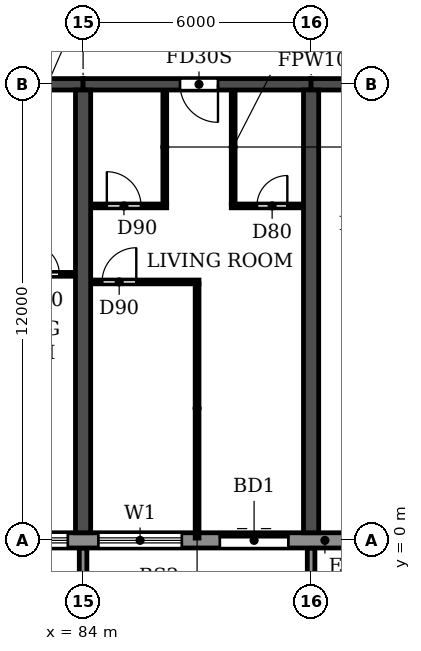
"""IFC4 building model, lengths in metres.
Left out: names, types, materials, properties, quantities, classifications, styles, units other than length and angle.
Written with IfcOpenShell. Run it as: python <this file> out.ifc"""

import sys

from ifc_helpers import new_model, si_unit, direction, frame, frame_2d, origin, place, context, subcontext, project, spatial, polyline, rectangle, outline, extrude, source, transform, mapped, element, fill, save


model = new_model("IFC4")
c1 = context("Model", 3, precision=1e-05, world=origin(), true_north=direction((0.0, 1.0)))
c2 = subcontext(c1, "Body", "Model", "MODEL_VIEW")
j1 = project(units=[si_unit("LENGTHUNIT", "METRE"), si_unit("PLANEANGLEUNIT", "RADIAN")], contexts=[c1])
p1 = place(None, origin())
s1 = spatial("IfcSite", under=j1, at=p1, CompositionType="ELEMENT")
p2 = place(p1, origin())
s2 = spatial("IfcBuilding", under=s1, at=p2, CompositionType="ELEMENT")
p3 = place(p2, frame((0.0, 0.0, 63.0)))
s3 = spatial("IfcBuildingStorey", under=s2, at=p3, CompositionType="ELEMENT", Elevation=63.0)
for number, where, z_axis, x_axis in (
    (1, (84.0, 0.2, 0.0), (0.0, 0.0, 1.0), (0.0, 1.0, 0.0)),
    (2, (90.0, 0.2, 0.0), (0.0, 0.0, 1.0), (0.0, 1.0, 0.0)),
):
    element("IfcWall", number, at=place(p3, frame(where, z_axis=z_axis, x_axis=x_axis)), inside=s3, PredefinedType="SHEAR", context=c2, shape_type="SweptSolid", body=[
        extrude(rectangle(XDim=11.65, YDim=0.4, at=frame_2d((5.825, 0.0))), origin(), (0.0, 0.0, 1.0), 2.95),
    ])
p4 = place(p3, frame((78.0, 12.0, 0.0), z_axis=(0.0, 0.0, 1.0), x_axis=(1.0, 0.0, 0.0)))
e3 = element("IfcWall", 3, at=p4, inside=s3, PredefinedType="SHEAR", context=c2, shape_type="SweptSolid", body=[
    extrude(rectangle(XDim=6.0, YDim=0.3, at=frame_2d((3.0, 0.0))), origin(), (0.0, 0.0, 1.0), 2.35),
])
p5 = place(p4, frame((2.55, 0.0, 0.0)))
e4 = element("IfcOpeningElement", 4, at=p5, cuts=e3, PredefinedType="OPENING", context=c2, shape_type="SweptSolid", body=[
    extrude(rectangle(XDim=1.0, YDim=2.1, at=frame_2d((0.5, 1.05))), frame((0.0, 0.16, 0.0), z_axis=(0.0, -1.0, 0.0), x_axis=(1.0, 0.0, 0.0)), (0.0, 0.0, 1.0), 0.32),
])
p6 = place(p3, frame((84.0, 12.0, 0.0), z_axis=(0.0, 0.0, 1.0), x_axis=(1.0, 0.0, 0.0)))
e5 = element("IfcWall", 5, at=p6, inside=s3, PredefinedType="SHEAR", context=c2, shape_type="SweptSolid", body=[
    extrude(rectangle(XDim=6.0, YDim=0.3, at=frame_2d((3.0, 0.0))), origin(), (0.0, 0.0, 1.0), 2.35),
])
p7 = place(p6, frame((2.55, 0.0, 0.0)))
e6 = element("IfcOpeningElement", 6, at=p7, cuts=e5, PredefinedType="OPENING", context=c2, shape_type="SweptSolid", body=[
    extrude(rectangle(XDim=1.0, YDim=2.1, at=frame_2d((0.5, 1.05))), frame((0.0, 0.16, 0.0), z_axis=(0.0, -1.0, 0.0), x_axis=(1.0, 0.0, 0.0)), (0.0, 0.0, 1.0), 0.32),
])
p8 = place(p3, frame((90.0, 12.0, 0.0), z_axis=(0.0, 0.0, 1.0), x_axis=(1.0, 0.0, 0.0)))
e7 = element("IfcWall", 7, at=p8, inside=s3, PredefinedType="SHEAR", context=c2, shape_type="SweptSolid", body=[
    extrude(rectangle(XDim=5.8, YDim=0.3, at=frame_2d((2.9, 0.0))), origin(), (0.0, 0.0, 1.0), 2.35),
])
p9 = place(p8, frame((2.5, 0.0, 0.0)))
e8 = element("IfcOpeningElement", 8, at=p9, cuts=e7, PredefinedType="OPENING", context=c2, shape_type="SweptSolid", body=[
    extrude(rectangle(XDim=1.0, YDim=2.1, at=frame_2d((0.5, 1.05))), frame((0.0, 0.16, 0.0), z_axis=(0.0, -1.0, 0.0), x_axis=(1.0, 0.0, 0.0)), (0.0, 0.0, 1.0), 0.32),
])
p10 = place(p3, frame((10.683, 0.0, 0.0), z_axis=(0.0, 0.0, 1.0), x_axis=(1.0, 0.0, 0.0)))
e9 = element("IfcWall", 9, at=p10, inside=s3, PredefinedType="STANDARD", context=c2, shape_type="SweptSolid", body=[
    extrude(rectangle(XDim=80.634, YDim=0.4, at=frame_2d((40.317, 0.0))), origin(), (0.0, 0.0, 1.0), 2.95),
])
p11 = place(p10, frame((1.717, 0.0, 0.9)))
e10 = element("IfcOpeningElement", 10, at=p11, cuts=e9, PredefinedType="OPENING", context=c2, shape_type="SweptSolid", body=[
    extrude(rectangle(XDim=2.2, YDim=1.5, at=frame_2d((1.1, 0.75))), frame((0.0, 0.21, 0.0), z_axis=(0.0, -1.0, 0.0), x_axis=(1.0, 0.0, 0.0)), (0.0, 0.0, 1.0), 0.42),
])
p12 = place(p10, frame((4.917, 0.0, 0.0)))
e11 = element("IfcOpeningElement", 11, at=p12, cuts=e9, PredefinedType="OPENING", context=c2, shape_type="SweptSolid", body=[
    extrude(rectangle(XDim=1.8, YDim=2.4, at=frame_2d((0.9, 1.2))), frame((0.0, 0.21, 0.0), z_axis=(0.0, -1.0, 0.0), x_axis=(1.0, 0.0, 0.0)), (0.0, 0.0, 1.0), 0.42),
])
p13 = place(p10, frame((7.717, 0.0, 0.9)))
e12 = element("IfcOpeningElement", 12, at=p13, cuts=e9, PredefinedType="OPENING", context=c2, shape_type="SweptSolid", body=[
    extrude(rectangle(XDim=2.2, YDim=1.5, at=frame_2d((1.1, 0.75))), frame((0.0, 0.21, 0.0), z_axis=(0.0, -1.0, 0.0), x_axis=(1.0, 0.0, 0.0)), (0.0, 0.0, 1.0), 0.42),
])
p14 = place(p10, frame((10.717, 0.0, 0.9)))
e13 = element("IfcOpeningElement", 13, at=p14, cuts=e9, PredefinedType="OPENING", context=c2, shape_type="SweptSolid", body=[
    extrude(rectangle(XDim=2.2, YDim=1.5, at=frame_2d((1.1, 0.75))), frame((0.0, 0.21, 0.0), z_axis=(0.0, -1.0, 0.0), x_axis=(1.0, 0.0, 0.0)), (0.0, 0.0, 1.0), 0.42),
])
p15 = place(p10, frame((13.717, 0.0, 0.9)))
e14 = element("IfcOpeningElement", 14, at=p15, cuts=e9, PredefinedType="OPENING", context=c2, shape_type="SweptSolid", body=[
    extrude(rectangle(XDim=2.2, YDim=1.5, at=frame_2d((1.1, 0.75))), frame((0.0, 0.21, 0.0), z_axis=(0.0, -1.0, 0.0), x_axis=(1.0, 0.0, 0.0)), (0.0, 0.0, 1.0), 0.42),
])
p16 = place(p10, frame((16.917, 0.0, 0.0)))
e15 = element("IfcOpeningElement", 15, at=p16, cuts=e9, PredefinedType="OPENING", context=c2, shape_type="SweptSolid", body=[
    extrude(rectangle(XDim=1.8, YDim=2.4, at=frame_2d((0.9, 1.2))), frame((0.0, 0.21, 0.0), z_axis=(0.0, -1.0, 0.0), x_axis=(1.0, 0.0, 0.0)), (0.0, 0.0, 1.0), 0.42),
])
p17 = place(p10, frame((19.717, 0.0, 0.9)))
e16 = element("IfcOpeningElement", 16, at=p17, cuts=e9, PredefinedType="OPENING", context=c2, shape_type="SweptSolid", body=[
    extrude(rectangle(XDim=2.2, YDim=1.5, at=frame_2d((1.1, 0.75))), frame((0.0, 0.21, 0.0), z_axis=(0.0, -1.0, 0.0), x_axis=(1.0, 0.0, 0.0)), (0.0, 0.0, 1.0), 0.42),
])
p18 = place(p10, frame((22.717, 0.0, 0.9)))
e17 = element("IfcOpeningElement", 17, at=p18, cuts=e9, PredefinedType="OPENING", context=c2, shape_type="SweptSolid", body=[
    extrude(rectangle(XDim=2.2, YDim=1.5, at=frame_2d((1.1, 0.75))), frame((0.0, 0.21, 0.0), z_axis=(0.0, -1.0, 0.0), x_axis=(1.0, 0.0, 0.0)), (0.0, 0.0, 1.0), 0.42),
])
p19 = place(p10, frame((25.917, 0.0, 0.0)))
e18 = element("IfcOpeningElement", 18, at=p19, cuts=e9, PredefinedType="OPENING", context=c2, shape_type="SweptSolid", body=[
    extrude(rectangle(XDim=1.8, YDim=2.4, at=frame_2d((0.9, 1.2))), frame((0.0, 0.21, 0.0), z_axis=(0.0, -1.0, 0.0), x_axis=(1.0, 0.0, 0.0)), (0.0, 0.0, 1.0), 0.42),
])
p20 = place(p10, frame((28.717, 0.0, 0.9)))
e19 = element("IfcOpeningElement", 19, at=p20, cuts=e9, PredefinedType="OPENING", context=c2, shape_type="SweptSolid", body=[
    extrude(rectangle(XDim=2.2, YDim=1.5, at=frame_2d((1.1, 0.75))), frame((0.0, 0.21, 0.0), z_axis=(0.0, -1.0, 0.0), x_axis=(1.0, 0.0, 0.0)), (0.0, 0.0, 1.0), 0.42),
])
p21 = place(p10, frame((31.717, 0.0, 0.9)))
e20 = element("IfcOpeningElement", 20, at=p21, cuts=e9, PredefinedType="OPENING", context=c2, shape_type="SweptSolid", body=[
    extrude(rectangle(XDim=2.2, YDim=1.5, at=frame_2d((1.1, 0.75))), frame((0.0, 0.21, 0.0), z_axis=(0.0, -1.0, 0.0), x_axis=(1.0, 0.0, 0.0)), (0.0, 0.0, 1.0), 0.42),
])
p22 = place(p10, frame((34.717, 0.0, 0.9)))
e21 = element("IfcOpeningElement", 21, at=p22, cuts=e9, PredefinedType="OPENING", context=c2, shape_type="SweptSolid", body=[
    extrude(rectangle(XDim=2.2, YDim=1.5, at=frame_2d((1.1, 0.75))), frame((0.0, 0.21, 0.0), z_axis=(0.0, -1.0, 0.0), x_axis=(1.0, 0.0, 0.0)), (0.0, 0.0, 1.0), 0.42),
])
p23 = place(p10, frame((37.717, 0.0, 0.9)))
e22 = element("IfcOpeningElement", 22, at=p23, cuts=e9, PredefinedType="OPENING", context=c2, shape_type="SweptSolid", body=[
    extrude(rectangle(XDim=2.2, YDim=1.5, at=frame_2d((1.1, 0.75))), frame((0.0, 0.21, 0.0), z_axis=(0.0, -1.0, 0.0), x_axis=(1.0, 0.0, 0.0)), (0.0, 0.0, 1.0), 0.42),
])
p24 = place(p10, frame((40.917, 0.0, 0.0)))
e23 = element("IfcOpeningElement", 23, at=p24, cuts=e9, PredefinedType="OPENING", context=c2, shape_type="SweptSolid", body=[
    extrude(rectangle(XDim=1.8, YDim=2.4, at=frame_2d((0.9, 1.2))), frame((0.0, 0.21, 0.0), z_axis=(0.0, -1.0, 0.0), x_axis=(1.0, 0.0, 0.0)), (0.0, 0.0, 1.0), 0.42),
])
p25 = place(p10, frame((43.717, 0.0, 0.9)))
e24 = element("IfcOpeningElement", 24, at=p25, cuts=e9, PredefinedType="OPENING", context=c2, shape_type="SweptSolid", body=[
    extrude(rectangle(XDim=2.2, YDim=1.5, at=frame_2d((1.1, 0.75))), frame((0.0, 0.21, 0.0), z_axis=(0.0, -1.0, 0.0), x_axis=(1.0, 0.0, 0.0)), (0.0, 0.0, 1.0), 0.42),
])
p26 = place(p10, frame((46.717, 0.0, 0.9)))
e25 = element("IfcOpeningElement", 25, at=p26, cuts=e9, PredefinedType="OPENING", context=c2, shape_type="SweptSolid", body=[
    extrude(rectangle(XDim=2.2, YDim=1.5, at=frame_2d((1.1, 0.75))), frame((0.0, 0.21, 0.0), z_axis=(0.0, -1.0, 0.0), x_axis=(1.0, 0.0, 0.0)), (0.0, 0.0, 1.0), 0.42),
])
p27 = place(p10, frame((49.717, 0.0, 0.9)))
e26 = element("IfcOpeningElement", 26, at=p27, cuts=e9, PredefinedType="OPENING", context=c2, shape_type="SweptSolid", body=[
    extrude(rectangle(XDim=2.2, YDim=1.5, at=frame_2d((1.1, 0.75))), frame((0.0, 0.21, 0.0), z_axis=(0.0, -1.0, 0.0), x_axis=(1.0, 0.0, 0.0)), (0.0, 0.0, 1.0), 0.42),
])
p28 = place(p10, frame((52.717, 0.0, 0.9)))
e27 = element("IfcOpeningElement", 27, at=p28, cuts=e9, PredefinedType="OPENING", context=c2, shape_type="SweptSolid", body=[
    extrude(rectangle(XDim=2.2, YDim=1.5, at=frame_2d((1.1, 0.75))), frame((0.0, 0.21, 0.0), z_axis=(0.0, -1.0, 0.0), x_axis=(1.0, 0.0, 0.0)), (0.0, 0.0, 1.0), 0.42),
])
p29 = place(p10, frame((55.717, 0.0, 0.9)))
e28 = element("IfcOpeningElement", 28, at=p29, cuts=e9, PredefinedType="OPENING", context=c2, shape_type="SweptSolid", body=[
    extrude(rectangle(XDim=2.2, YDim=1.5, at=frame_2d((1.1, 0.75))), frame((0.0, 0.21, 0.0), z_axis=(0.0, -1.0, 0.0), x_axis=(1.0, 0.0, 0.0)), (0.0, 0.0, 1.0), 0.42),
])
p30 = place(p10, frame((58.717, 0.0, 0.9)))
e29 = element("IfcOpeningElement", 29, at=p30, cuts=e9, PredefinedType="OPENING", context=c2, shape_type="SweptSolid", body=[
    extrude(rectangle(XDim=2.2, YDim=1.5, at=frame_2d((1.1, 0.75))), frame((0.0, 0.21, 0.0), z_axis=(0.0, -1.0, 0.0), x_axis=(1.0, 0.0, 0.0)), (0.0, 0.0, 1.0), 0.42),
])
p31 = place(p10, frame((61.717, 0.0, 0.9)))
e30 = element("IfcOpeningElement", 30, at=p31, cuts=e9, PredefinedType="OPENING", context=c2, shape_type="SweptSolid", body=[
    extrude(rectangle(XDim=2.2, YDim=1.5, at=frame_2d((1.1, 0.75))), frame((0.0, 0.21, 0.0), z_axis=(0.0, -1.0, 0.0), x_axis=(1.0, 0.0, 0.0)), (0.0, 0.0, 1.0), 0.42),
])
p32 = place(p10, frame((64.917, 0.0, 0.0)))
e31 = element("IfcOpeningElement", 31, at=p32, cuts=e9, PredefinedType="OPENING", context=c2, shape_type="SweptSolid", body=[
    extrude(rectangle(XDim=1.8, YDim=2.4, at=frame_2d((0.9, 1.2))), frame((0.0, 0.21, 0.0), z_axis=(0.0, -1.0, 0.0), x_axis=(1.0, 0.0, 0.0)), (0.0, 0.0, 1.0), 0.42),
])
p33 = place(p10, frame((67.717, 0.0, 0.9)))
e32 = element("IfcOpeningElement", 32, at=p33, cuts=e9, PredefinedType="OPENING", context=c2, shape_type="SweptSolid", body=[
    extrude(rectangle(XDim=2.2, YDim=1.5, at=frame_2d((1.1, 0.75))), frame((0.0, 0.21, 0.0), z_axis=(0.0, -1.0, 0.0), x_axis=(1.0, 0.0, 0.0)), (0.0, 0.0, 1.0), 0.42),
])
p34 = place(p10, frame((70.717, 0.0, 0.9)))
e33 = element("IfcOpeningElement", 33, at=p34, cuts=e9, PredefinedType="OPENING", context=c2, shape_type="SweptSolid", body=[
    extrude(rectangle(XDim=2.2, YDim=1.5, at=frame_2d((1.1, 0.75))), frame((0.0, 0.21, 0.0), z_axis=(0.0, -1.0, 0.0), x_axis=(1.0, 0.0, 0.0)), (0.0, 0.0, 1.0), 0.42),
])
p35 = place(p10, frame((73.717, 0.0, 0.9)))
e34 = element("IfcOpeningElement", 34, at=p35, cuts=e9, PredefinedType="OPENING", context=c2, shape_type="SweptSolid", body=[
    extrude(rectangle(XDim=2.2, YDim=1.5, at=frame_2d((1.1, 0.75))), frame((0.0, 0.21, 0.0), z_axis=(0.0, -1.0, 0.0), x_axis=(1.0, 0.0, 0.0)), (0.0, 0.0, 1.0), 0.42),
])
p36 = place(p10, frame((76.917, 0.0, 0.0)))
e35 = element("IfcOpeningElement", 35, at=p36, cuts=e9, PredefinedType="OPENING", context=c2, shape_type="SweptSolid", body=[
    extrude(rectangle(XDim=1.8, YDim=2.4, at=frame_2d((0.9, 1.2))), frame((0.0, 0.21, 0.0), z_axis=(0.0, -1.0, 0.0), x_axis=(1.0, 0.0, 0.0)), (0.0, 0.0, 1.0), 0.42),
])
m1 = source(origin(), c2, "Body", "SweptSolid", [
    extrude(outline(polyline([(0.0, 0.0), (0.2, 0.0), (0.2, 1.65), (0.0, 1.65), (0.0, 0.0)])), origin(), (0.0, 0.0, 1.0), 3.1),
])
for number, where in (
    (36, (83.9, -1.85, 0.0)),
    (37, (89.9, -1.85, 0.0)),
):
    element("IfcWall", number, at=place(p3, frame(where)), inside=s3, PredefinedType="STANDARD", context=c2, shape_type="MappedRepresentation", body=[
        mapped(m1, transform((0.0, 0.0, 0.0))),
    ])
p37 = place(p3, frame((84.21, 6.8, 0.0), z_axis=(0.0, 0.0, 1.0), x_axis=(1.0, 0.0, 0.0)))
e38 = element("IfcWall", 38, at=p37, inside=s3, PredefinedType="PARTITIONING", context=c2, shape_type="SweptSolid", body=[
    extrude(rectangle(XDim=2.84, YDim=0.1, at=frame_2d((1.42, 0.0))), origin(), (0.0, 0.0, 1.0), 2.95),
])
p38 = place(p37, frame((0.29, 0.0, 0.0)))
e39 = element("IfcOpeningElement", 39, at=p38, cuts=e38, PredefinedType="OPENING", context=c2, shape_type="SweptSolid", body=[
    extrude(rectangle(XDim=0.9, YDim=2.1, at=frame_2d((0.45, 1.05))), frame((0.0, 0.06, 0.0), z_axis=(0.0, -1.0, 0.0), x_axis=(1.0, 0.0, 0.0)), (0.0, 0.0, 1.0), 0.12),
])
p39 = place(p3, frame((81.9, 7.0, 0.0), z_axis=(0.0, 0.0, 1.0), x_axis=(1.0, 0.0, 0.0)))
e40 = element("IfcWall", 40, at=p39, inside=s3, PredefinedType="PARTITIONING", context=c2, shape_type="SweptSolid", body=[
    extrude(rectangle(XDim=1.89, YDim=0.1, at=frame_2d((0.945, 0.0))), origin(), (0.0, 0.0, 1.0), 2.95),
])
p40 = place(p39, frame((0.675, 0.0, 0.0)))
e41 = element("IfcOpeningElement", 41, at=p40, cuts=e40, PredefinedType="OPENING", context=c2, shape_type="SweptSolid", body=[
    extrude(rectangle(XDim=0.8, YDim=2.1, at=frame_2d((0.4, 1.05))), frame((0.0, 0.06, 0.0), z_axis=(0.0, -1.0, 0.0), x_axis=(1.0, 0.0, 0.0)), (0.0, 0.0, 1.0), 0.12),
])
p41 = place(p3, frame((84.21, 8.8, 0.0), z_axis=(0.0, 0.0, 1.0), x_axis=(1.0, 0.0, 0.0)))
e42 = element("IfcWall", 42, at=p41, inside=s3, PredefinedType="PARTITIONING", context=c2, shape_type="SweptSolid", body=[
    extrude(rectangle(XDim=1.99, YDim=0.1, at=frame_2d((0.995, 0.0))), origin(), (0.0, 0.0, 1.0), 2.95),
])
p42 = place(p41, frame((0.415, 0.0, 0.0)))
e43 = element("IfcOpeningElement", 43, at=p42, cuts=e42, PredefinedType="OPENING", context=c2, shape_type="SweptSolid", body=[
    extrude(rectangle(XDim=0.9, YDim=2.1, at=frame_2d((0.45, 1.05))), frame((0.0, 0.06, 0.0), z_axis=(0.0, -1.0, 0.0), x_axis=(1.0, 0.0, 0.0)), (0.0, 0.0, 1.0), 0.12),
])
p43 = place(p3, frame((87.9, 8.8, 0.0), z_axis=(0.0, 0.0, 1.0), x_axis=(1.0, 0.0, 0.0)))
e44 = element("IfcWall", 44, at=p43, inside=s3, PredefinedType="PARTITIONING", context=c2, shape_type="SweptSolid", body=[
    extrude(rectangle(XDim=1.89, YDim=0.1, at=frame_2d((0.945, 0.0))), origin(), (0.0, 0.0, 1.0), 2.95),
])
p44 = place(p43, frame((0.675, 0.0, 0.0)))
e45 = element("IfcOpeningElement", 45, at=p44, cuts=e44, PredefinedType="OPENING", context=c2, shape_type="SweptSolid", body=[
    extrude(rectangle(XDim=0.8, YDim=2.1, at=frame_2d((0.4, 1.05))), frame((0.0, 0.06, 0.0), z_axis=(0.0, -1.0, 0.0), x_axis=(1.0, 0.0, 0.0)), (0.0, 0.0, 1.0), 0.12),
])
p45 = place(p3, frame((86.15, 8.85, 0.0), z_axis=(0.0, 0.0, 1.0), x_axis=(0.0, 1.0, 0.0)))
e46 = element("IfcWall", 46, at=p45, inside=s3, PredefinedType="PARTITIONING", context=c2, shape_type="SweptSolid", body=[
    extrude(rectangle(XDim=2.99, YDim=0.1, at=frame_2d((1.495, 0.0))), origin(), (0.0, 0.0, 1.0), 2.95),
])
p46 = place(p3, frame((87.0, 0.06, 0.0), z_axis=(0.0, 0.0, 1.0), x_axis=(0.0, 1.0, 0.0)))
e47 = element("IfcWall", 47, at=p46, inside=s3, PredefinedType="PARTITIONING", context=c2, shape_type="SweptSolid", body=[
    extrude(rectangle(XDim=6.69, YDim=0.1, at=frame_2d((3.345, 0.0))), origin(), (0.0, 0.0, 1.0), 2.95),
])
p47 = place(p3, frame((87.95, 8.85, 0.0), z_axis=(0.0, 0.0, 1.0), x_axis=(0.0, 1.0, 0.0)))
e48 = element("IfcWall", 48, at=p47, inside=s3, PredefinedType="PARTITIONING", context=c2, shape_type="SweptSolid", body=[
    extrude(rectangle(XDim=2.99, YDim=0.1, at=frame_2d((1.495, 0.0))), origin(), (0.0, 0.0, 1.0), 2.95),
])
p48 = place(p34, origin())
e49 = element("IfcWindow", 49, at=p48, inside=s3, PartitioningType="DOUBLE_PANEL_HORIZONTAL", PredefinedType="WINDOW", context=c2, shape_type="SweptSolid", body=[
    extrude(rectangle(XDim=2.2, YDim=1.5, at=frame_2d((1.1, 0.75))), frame((0.0, 0.03, 0.0), z_axis=(0.0, -1.0, 0.0), x_axis=(1.0, 0.0, 0.0)), (0.0, 0.0, 1.0), 0.06),
])
fill(e33, e49)
p49 = place(p35, origin())
e50 = element("IfcWindow", 50, at=p49, inside=s3, PartitioningType="DOUBLE_PANEL_HORIZONTAL", PredefinedType="WINDOW", context=c2, shape_type="SweptSolid", body=[
    extrude(rectangle(XDim=2.2, YDim=1.5, at=frame_2d((1.1, 0.75))), frame((0.0, 0.03, 0.0), z_axis=(0.0, -1.0, 0.0), x_axis=(1.0, 0.0, 0.0)), (0.0, 0.0, 1.0), 0.06),
])
fill(e34, e50)
p50 = place(p36, origin())
e51 = element("IfcDoor", 51, at=p50, inside=s3, OperationType="DOUBLE_DOOR_SLIDING", PredefinedType="DOOR", context=c2, shape_type="SweptSolid", body=[
    extrude(rectangle(XDim=1.8, YDim=2.4, at=frame_2d((0.9, 1.2))), frame((0.0, 0.025, 0.0), z_axis=(0.0, -1.0, 0.0), x_axis=(1.0, 0.0, 0.0)), (0.0, 0.0, 1.0), 0.05),
])
fill(e35, e51)
p51 = place(p40, origin())
e52 = element("IfcDoor", 52, at=p51, inside=s3, OperationType="SINGLE_SWING_LEFT", PredefinedType="DOOR", context=c2, shape_type="SweptSolid", body=[
    extrude(rectangle(XDim=0.8, YDim=2.1, at=frame_2d((0.4, 1.05))), frame((0.0, 0.025, 0.0), z_axis=(0.0, -1.0, 0.0), x_axis=(1.0, 0.0, 0.0)), (0.0, 0.0, 1.0), 0.05),
])
fill(e41, e52)
p52 = place(p38, origin())
e53 = element("IfcDoor", 53, at=p52, inside=s3, OperationType="SINGLE_SWING_RIGHT", PredefinedType="DOOR", context=c2, shape_type="SweptSolid", body=[
    extrude(rectangle(XDim=0.9, YDim=2.1, at=frame_2d((0.45, 1.05))), frame((0.0, 0.025, 0.0), z_axis=(0.0, -1.0, 0.0), x_axis=(1.0, 0.0, 0.0)), (0.0, 0.0, 1.0), 0.05),
])
fill(e39, e53)
p53 = place(p42, origin())
e54 = element("IfcDoor", 54, at=p53, inside=s3, OperationType="SINGLE_SWING_LEFT", PredefinedType="DOOR", context=c2, shape_type="SweptSolid", body=[
    extrude(rectangle(XDim=0.9, YDim=2.1, at=frame_2d((0.45, 1.05))), frame((0.0, 0.025, 0.0), z_axis=(0.0, -1.0, 0.0), x_axis=(1.0, 0.0, 0.0)), (0.0, 0.0, 1.0), 0.05),
])
fill(e43, e54)
p54 = place(p7, frame((1.0, 0.0, 0.0), z_axis=(0.0, 0.0, 1.0), x_axis=(-1.0, 0.0, 0.0)))
e55 = element("IfcDoor", 55, at=p54, inside=s3, OperationType="SINGLE_SWING_LEFT", PredefinedType="DOOR", context=c2, shape_type="SweptSolid", body=[
    extrude(rectangle(XDim=1.0, YDim=2.1, at=frame_2d((0.5, 1.05))), frame((0.0, 0.025, 0.0), z_axis=(0.0, -1.0, 0.0), x_axis=(1.0, 0.0, 0.0)), (0.0, 0.0, 1.0), 0.05),
])
fill(e6, e55)
p55 = place(p44, origin())
e56 = element("IfcDoor", 56, at=p55, inside=s3, OperationType="SINGLE_SWING_RIGHT", PredefinedType="DOOR", context=c2, shape_type="SweptSolid", body=[
    extrude(rectangle(XDim=0.8, YDim=2.1, at=frame_2d((0.4, 1.05))), frame((0.0, 0.025, 0.0), z_axis=(0.0, -1.0, 0.0), x_axis=(1.0, 0.0, 0.0)), (0.0, 0.0, 1.0), 0.05),
])
fill(e45, e56)
save(model, sys.argv[1])
